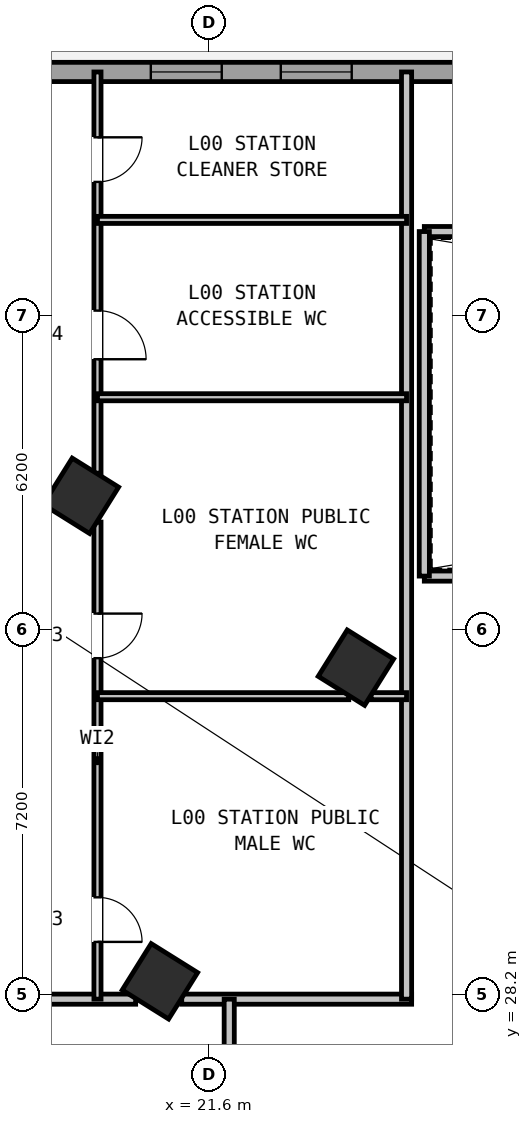
"""IFC4 building model, lengths in metres.
Left out: names, types, materials, properties, quantities, classifications, styles, units other than length and angle.
Written with IfcOpenShell. Run it as: python <this file> out.ifc"""

import sys

from ifc_helpers import new_model, si_unit, direction, frame, frame_2d, origin, origin_2d, place, context, subcontext, project, spatial, rectangle, hollow_rectangle, extrude, source, transform, mapped, element, fill, save


model = new_model("IFC4")
c1 = context("Model", 3, precision=1e-05, world=origin(), true_north=direction((0.0, 1.0)))
c2 = subcontext(c1, "Body", "Model", "MODEL_VIEW")
j1 = project(units=[si_unit("LENGTHUNIT", "METRE"), si_unit("PLANEANGLEUNIT", "RADIAN")], contexts=[c1])
p1 = place(None, origin())
s1 = spatial("IfcSite", under=j1, at=p1, CompositionType="ELEMENT")
p2 = place(p1, origin())
s2 = spatial("IfcBuilding", under=s1, at=p2, CompositionType="ELEMENT")
p3 = place(p2, origin())
s3 = spatial("IfcBuildingStorey", under=s2, at=p3, CompositionType="ELEMENT", Elevation=0.0)
m1 = source(origin(), c2, "Body", "SweptSolid", [
    extrude(hollow_rectangle(XDim=1.08, YDim=1.08, WallThickness=0.04, at=origin_2d()), origin(), (0.0, 0.0, 1.0), 5.4),
])
for number, where, z_axis, x_axis in (
    (1, (24.5, 34.643, 0.0), (0.0, 0.0, 1.0), (-0.848, 0.53, 0.0)),
    (2, (20.632, 28.452, 0.0), (0.0, 0.0, 1.0), (-0.848, 0.53, 0.0)),
    (3, (19.073, 38.034, 0.0), (0.0, 0.0, 1.0), (-0.848, 0.53, 0.0)),
):
    element("IfcColumn", number, at=place(p3, frame(where, z_axis=z_axis, x_axis=x_axis)), inside=s3, PredefinedType="COLUMN", context=c2, shape_type="MappedRepresentation", body=[
        mapped(m1, transform((0.0, 0.0, 0.0), scale=1.0)),
    ])
p4 = place(p3, frame((4.883, 46.4, 0.0), z_axis=(0.0, 0.0, 1.0), x_axis=(1.0, 0.0, 0.0)))
e4 = element("IfcWall", 4, at=p4, inside=s3, PredefinedType="STANDARD", context=c2, shape_type="SweptSolid", body=[
    extrude(rectangle(XDim=62.234, YDim=0.38, at=frame_2d((31.117, 0.0))), origin(), (0.0, 0.0, 1.0), 5.05),
])
p5 = place(p4, frame((1.542, 0.0, 0.85)))
e5 = element("IfcOpeningElement", 5, at=p5, cuts=e4, PredefinedType="OPENING", context=c2, shape_type="SweptSolid", body=[
    extrude(rectangle(XDim=2.2, YDim=1.75, at=frame_2d((1.1, 0.875))), frame((0.0, 0.2, 0.0), z_axis=(0.0, -1.0, 0.0), x_axis=(1.0, 0.0, 0.0)), (0.0, 0.0, 1.0), 0.4),
])
p6 = place(p4, frame((5.525, 0.0, 0.85)))
e6 = element("IfcOpeningElement", 6, at=p6, cuts=e4, PredefinedType="OPENING", context=c2, shape_type="SweptSolid", body=[
    extrude(rectangle(XDim=2.2, YDim=1.75, at=frame_2d((1.1, 0.875))), frame((0.0, 0.2, 0.0), z_axis=(0.0, -1.0, 0.0), x_axis=(1.0, 0.0, 0.0)), (0.0, 0.0, 1.0), 0.4),
])
p7 = place(p4, frame((10.175, 0.0, 1.0)))
e7 = element("IfcOpeningElement", 7, at=p7, cuts=e4, PredefinedType="OPENING", context=c2, shape_type="SweptSolid", body=[
    extrude(rectangle(XDim=1.1, YDim=1.35, at=frame_2d((0.55, 0.675))), frame((0.0, 0.2, 0.0), z_axis=(0.0, -1.0, 0.0), x_axis=(1.0, 0.0, 0.0)), (0.0, 0.0, 1.0), 0.4),
])
p8 = place(p4, frame((12.39, 0.0, 1.0)))
e8 = element("IfcOpeningElement", 8, at=p8, cuts=e4, PredefinedType="OPENING", context=c2, shape_type="SweptSolid", body=[
    extrude(rectangle(XDim=1.1, YDim=1.35, at=frame_2d((0.55, 0.675))), frame((0.0, 0.2, 0.0), z_axis=(0.0, -1.0, 0.0), x_axis=(1.0, 0.0, 0.0)), (0.0, 0.0, 1.0), 0.4),
])
p9 = place(p4, frame((15.57, 0.0, 0.95)))
e9 = element("IfcOpeningElement", 9, at=p9, cuts=e4, PredefinedType="OPENING", context=c2, shape_type="SweptSolid", body=[
    extrude(rectangle(XDim=1.4, YDim=1.5, at=frame_2d((0.7, 0.75))), frame((0.0, 0.2, 0.0), z_axis=(0.0, -1.0, 0.0), x_axis=(1.0, 0.0, 0.0)), (0.0, 0.0, 1.0), 0.4),
])
p10 = place(p4, frame((18.135, 0.0, 0.95)))
e10 = element("IfcOpeningElement", 10, at=p10, cuts=e4, PredefinedType="OPENING", context=c2, shape_type="SweptSolid", body=[
    extrude(rectangle(XDim=1.4, YDim=1.5, at=frame_2d((0.7, 0.75))), frame((0.0, 0.2, 0.0), z_axis=(0.0, -1.0, 0.0), x_axis=(1.0, 0.0, 0.0)), (0.0, 0.0, 1.0), 0.4),
])
p11 = place(p4, frame((21.857, 0.0, 0.85)))
e11 = element("IfcOpeningElement", 11, at=p11, cuts=e4, PredefinedType="OPENING", context=c2, shape_type="SweptSolid", body=[
    extrude(rectangle(XDim=2.2, YDim=1.75, at=frame_2d((1.1, 0.875))), frame((0.0, 0.2, 0.0), z_axis=(0.0, -1.0, 0.0), x_axis=(1.0, 0.0, 0.0)), (0.0, 0.0, 1.0), 0.4),
])
p12 = place(p4, frame((25.535, 0.0, 0.85)))
e12 = element("IfcOpeningElement", 12, at=p12, cuts=e4, PredefinedType="OPENING", context=c2, shape_type="SweptSolid", body=[
    extrude(rectangle(XDim=2.2, YDim=1.75, at=frame_2d((1.1, 0.875))), frame((0.0, 0.2, 0.0), z_axis=(0.0, -1.0, 0.0), x_axis=(1.0, 0.0, 0.0)), (0.0, 0.0, 1.0), 0.4),
])
p13 = place(p4, frame((29.214, 0.0, 0.85)))
e13 = element("IfcOpeningElement", 13, at=p13, cuts=e4, PredefinedType="OPENING", context=c2, shape_type="SweptSolid", body=[
    extrude(rectangle(XDim=2.2, YDim=1.75, at=frame_2d((1.1, 0.875))), frame((0.0, 0.2, 0.0), z_axis=(0.0, -1.0, 0.0), x_axis=(1.0, 0.0, 0.0)), (0.0, 0.0, 1.0), 0.4),
])
p14 = place(p4, frame((32.893, 0.0, 0.85)))
e14 = element("IfcOpeningElement", 14, at=p14, cuts=e4, PredefinedType="OPENING", context=c2, shape_type="SweptSolid", body=[
    extrude(rectangle(XDim=2.2, YDim=1.75, at=frame_2d((1.1, 0.875))), frame((0.0, 0.2, 0.0), z_axis=(0.0, -1.0, 0.0), x_axis=(1.0, 0.0, 0.0)), (0.0, 0.0, 1.0), 0.4),
])
p15 = place(p4, frame((36.572, 0.0, 0.85)))
e15 = element("IfcOpeningElement", 15, at=p15, cuts=e4, PredefinedType="OPENING", context=c2, shape_type="SweptSolid", body=[
    extrude(rectangle(XDim=2.2, YDim=1.75, at=frame_2d((1.1, 0.875))), frame((0.0, 0.2, 0.0), z_axis=(0.0, -1.0, 0.0), x_axis=(1.0, 0.0, 0.0)), (0.0, 0.0, 1.0), 0.4),
])
p16 = place(p4, frame((40.251, 0.0, 0.85)))
e16 = element("IfcOpeningElement", 16, at=p16, cuts=e4, PredefinedType="OPENING", context=c2, shape_type="SweptSolid", body=[
    extrude(rectangle(XDim=2.2, YDim=1.75, at=frame_2d((1.1, 0.875))), frame((0.0, 0.2, 0.0), z_axis=(0.0, -1.0, 0.0), x_axis=(1.0, 0.0, 0.0)), (0.0, 0.0, 1.0), 0.4),
])
p17 = place(p4, frame((43.93, 0.0, 0.85)))
e17 = element("IfcOpeningElement", 17, at=p17, cuts=e4, PredefinedType="OPENING", context=c2, shape_type="SweptSolid", body=[
    extrude(rectangle(XDim=2.2, YDim=1.75, at=frame_2d((1.1, 0.875))), frame((0.0, 0.2, 0.0), z_axis=(0.0, -1.0, 0.0), x_axis=(1.0, 0.0, 0.0)), (0.0, 0.0, 1.0), 0.4),
])
p18 = place(p4, frame((47.608, 0.0, 0.85)))
e18 = element("IfcOpeningElement", 18, at=p18, cuts=e4, PredefinedType="OPENING", context=c2, shape_type="SweptSolid", body=[
    extrude(rectangle(XDim=2.2, YDim=1.75, at=frame_2d((1.1, 0.875))), frame((0.0, 0.2, 0.0), z_axis=(0.0, -1.0, 0.0), x_axis=(1.0, 0.0, 0.0)), (0.0, 0.0, 1.0), 0.4),
])
p19 = place(p4, frame((51.287, 0.0, 0.85)))
e19 = element("IfcOpeningElement", 19, at=p19, cuts=e4, PredefinedType="OPENING", context=c2, shape_type="SweptSolid", body=[
    extrude(rectangle(XDim=2.2, YDim=1.75, at=frame_2d((1.1, 0.875))), frame((0.0, 0.2, 0.0), z_axis=(0.0, -1.0, 0.0), x_axis=(1.0, 0.0, 0.0)), (0.0, 0.0, 1.0), 0.4),
])
p20 = place(p4, frame((54.966, 0.0, 0.85)))
e20 = element("IfcOpeningElement", 20, at=p20, cuts=e4, PredefinedType="OPENING", context=c2, shape_type="SweptSolid", body=[
    extrude(rectangle(XDim=2.2, YDim=1.75, at=frame_2d((1.1, 0.875))), frame((0.0, 0.2, 0.0), z_axis=(0.0, -1.0, 0.0), x_axis=(1.0, 0.0, 0.0)), (0.0, 0.0, 1.0), 0.4),
])
p21 = place(p4, frame((58.645, 0.0, 0.85)))
e21 = element("IfcOpeningElement", 21, at=p21, cuts=e4, PredefinedType="OPENING", context=c2, shape_type="SweptSolid", body=[
    extrude(rectangle(XDim=2.2, YDim=1.75, at=frame_2d((1.1, 0.875))), frame((0.0, 0.2, 0.0), z_axis=(0.0, -1.0, 0.0), x_axis=(1.0, 0.0, 0.0)), (0.0, 0.0, 1.0), 0.4),
])
p22 = place(p3, frame((1.6, 28.1, 0.0), z_axis=(0.0, 0.0, 1.0), x_axis=(1.0, 0.0, 0.0)))
e22 = element("IfcWall", 22, at=p22, inside=s3, PredefinedType="STANDARD", context=c2, shape_type="SweptSolid", body=[
    extrude(rectangle(XDim=18.554, YDim=0.2, at=frame_2d((9.277, 0.0))), origin(), (0.0, 0.0, 1.0), 5.04),
])
p23 = place(p22, frame((5.2, 0.0, 0.0)))
e23 = element("IfcOpeningElement", 23, at=p23, cuts=e22, PredefinedType="OPENING", context=c2, shape_type="SweptSolid", body=[
    extrude(rectangle(XDim=1.7, YDim=2.2, at=frame_2d((0.85, 1.1))), frame((0.0, 0.11, 0.0), z_axis=(0.0, -1.0, 0.0), x_axis=(1.0, 0.0, 0.0)), (0.0, 0.0, 1.0), 0.22),
])
p24 = place(p22, frame((13.0, 0.0, 0.0)))
e24 = element("IfcOpeningElement", 24, at=p24, cuts=e22, PredefinedType="OPENING", context=c2, shape_type="SweptSolid", body=[
    extrude(rectangle(XDim=1.0, YDim=2.1, at=frame_2d((0.5, 1.05))), frame((0.0, 0.11, 0.0), z_axis=(0.0, -1.0, 0.0), x_axis=(1.0, 0.0, 0.0)), (0.0, 0.0, 1.0), 0.22),
])
p25 = place(p3, frame((21.063, 28.1, 0.0), z_axis=(0.0, 0.0, 1.0), x_axis=(1.0, 0.0, 0.0)))
e25 = element("IfcWall", 25, at=p25, inside=s3, PredefinedType="STANDARD", context=c2, shape_type="SweptSolid", body=[
    extrude(rectangle(XDim=4.537, YDim=0.2, at=frame_2d((2.269, 0.0))), origin(), (0.0, 0.0, 1.0), 5.04),
])
p26 = place(p3, frame((22.0, 19.53, 0.0), z_axis=(0.0, 0.0, 1.0), x_axis=(0.0, 1.0, 0.0)))
e26 = element("IfcWall", 26, at=p26, inside=s3, PredefinedType="STANDARD", context=c2, shape_type="SweptSolid", body=[
    extrude(rectangle(XDim=8.57, YDim=0.2, at=frame_2d((4.285, 0.0))), origin(), (0.0, 0.0, 1.0), 5.04),
])
p27 = place(p3, frame((25.5, 28.1, 0.0), z_axis=(0.0, 0.0, 1.0), x_axis=(0.0, 1.0, 0.0)))
e27 = element("IfcWall", 27, at=p27, inside=s3, PredefinedType="STANDARD", context=c2, shape_type="SweptSolid", body=[
    extrude(rectangle(XDim=18.3, YDim=0.2, at=frame_2d((9.15, 0.0))), origin(), (0.0, 0.0, 1.0), 5.04),
])
p28 = place(p3, frame((19.4, 28.1, 0.0), z_axis=(0.0, 0.0, 1.0), x_axis=(0.0, 1.0, 0.0)))
e28 = element("IfcWall", 28, at=p28, inside=s3, PredefinedType="PLUMBINGWALL", context=c2, shape_type="SweptSolid", body=[
    extrude(rectangle(XDim=9.416, YDim=0.14, at=frame_2d((4.708, 0.0))), origin(), (0.0, 0.0, 1.0), 5.04),
])
p29 = place(p28, frame((1.13, 0.0, 0.0)))
e29 = element("IfcOpeningElement", 29, at=p29, cuts=e28, PredefinedType="OPENING", context=c2, shape_type="SweptSolid", body=[
    extrude(rectangle(XDim=0.88, YDim=2.08, at=frame_2d((0.44, 1.04))), frame((0.0, 0.08, 0.0), z_axis=(0.0, -1.0, 0.0), x_axis=(1.0, 0.0, 0.0)), (0.0, 0.0, 1.0), 0.16),
])
p30 = place(p28, frame((6.73, 0.0, 0.0)))
e30 = element("IfcOpeningElement", 30, at=p30, cuts=e28, PredefinedType="OPENING", context=c2, shape_type="SweptSolid", body=[
    extrude(rectangle(XDim=0.88, YDim=2.08, at=frame_2d((0.44, 1.04))), frame((0.0, 0.08, 0.0), z_axis=(0.0, -1.0, 0.0), x_axis=(1.0, 0.0, 0.0)), (0.0, 0.0, 1.0), 0.16),
])
p31 = place(p3, frame((19.4, 38.481, 0.0), z_axis=(0.0, 0.0, 1.0), x_axis=(0.0, 1.0, 0.0)))
e31 = element("IfcWall", 31, at=p31, inside=s3, PredefinedType="PLUMBINGWALL", context=c2, shape_type="SweptSolid", body=[
    extrude(rectangle(XDim=7.919, YDim=0.14, at=frame_2d((3.959, 0.0))), origin(), (0.0, 0.0, 1.0), 5.04),
])
p32 = place(p31, frame((2.249, 0.0, 0.0)))
e32 = element("IfcOpeningElement", 32, at=p32, cuts=e31, PredefinedType="OPENING", context=c2, shape_type="SweptSolid", body=[
    extrude(rectangle(XDim=0.96, YDim=2.08, at=frame_2d((0.48, 1.04))), frame((0.0, 0.08, 0.0), z_axis=(0.0, -1.0, 0.0), x_axis=(1.0, 0.0, 0.0)), (0.0, 0.0, 1.0), 0.16),
])
p33 = place(p31, frame((5.749, 0.0, 0.0)))
e33 = element("IfcOpeningElement", 33, at=p33, cuts=e31, PredefinedType="OPENING", context=c2, shape_type="SweptSolid", body=[
    extrude(rectangle(XDim=0.88, YDim=2.08, at=frame_2d((0.44, 1.04))), frame((0.0, 0.08, 0.0), z_axis=(0.0, -1.0, 0.0), x_axis=(1.0, 0.0, 0.0)), (0.0, 0.0, 1.0), 0.16),
])
p34 = place(p3, frame((19.4, 34.08, 0.0), z_axis=(0.0, 0.0, 1.0), x_axis=(1.0, 0.0, 0.0)))
e34 = element("IfcWall", 34, at=p34, inside=s3, PredefinedType="PLUMBINGWALL", context=c2, shape_type="SweptSolid", body=[
    extrude(rectangle(XDim=4.96, YDim=0.14, at=frame_2d((2.48, 0.0))), origin(), (0.0, 0.0, 1.0), 5.04),
])
p35 = place(p3, frame((24.8, 34.08, 0.0), z_axis=(0.0, 0.0, 1.0), x_axis=(1.0, 0.0, 0.0)))
e35 = element("IfcWall", 35, at=p35, inside=s3, PredefinedType="PLUMBINGWALL", context=c2, shape_type="SweptSolid", body=[
    extrude(rectangle(XDim=0.7, YDim=0.14, at=frame_2d((0.35, 0.0))), origin(), (0.0, 0.0, 1.0), 5.04),
])
for number, where, z_axis, x_axis in (
    (36, (19.4, 39.98, 0.0), (0.0, 0.0, 1.0), (1.0, 0.0, 0.0)),
    (37, (19.4, 43.48, 0.0), (0.0, 0.0, 1.0), (1.0, 0.0, 0.0)),
):
    element("IfcWall", number, at=place(p3, frame(where, z_axis=z_axis, x_axis=x_axis)), inside=s3, PredefinedType="PLUMBINGWALL", context=c2, shape_type="SweptSolid", body=[
        extrude(rectangle(XDim=6.1, YDim=0.14, at=frame_2d((3.05, 0.0))), origin(), (0.0, 0.0, 1.0), 5.04),
    ])
p36 = place(p3, frame((25.85, 36.45, 0.0), z_axis=(0.0, 0.0, 1.0), x_axis=(1.0, 0.0, 0.0)))
e38 = element("IfcWall", 38, at=p36, inside=s3, PredefinedType="STANDARD", context=c2, shape_type="SweptSolid", body=[
    extrude(rectangle(XDim=44.55, YDim=0.2, at=frame_2d((22.275, 0.0))), origin(), (0.0, 0.0, 1.0), 5.04),
])
p37 = place(p3, frame((25.85, 43.25, 0.0), z_axis=(0.0, 0.0, 1.0), x_axis=(1.0, 0.0, 0.0)))
e39 = element("IfcWall", 39, at=p37, inside=s3, PredefinedType="STANDARD", context=c2, shape_type="SweptSolid", body=[
    extrude(rectangle(XDim=3.398, YDim=0.2, at=frame_2d((1.699, 0.0))), origin(), (0.0, 0.0, 1.0), 5.04),
])
p38 = place(p3, frame((25.85, 36.45, 0.0), z_axis=(0.0, 0.0, 1.0), x_axis=(0.0, 1.0, 0.0)))
e40 = element("IfcWall", 40, at=p38, inside=s3, PredefinedType="STANDARD", context=c2, shape_type="SweptSolid", body=[
    extrude(rectangle(XDim=6.8, YDim=0.2, at=frame_2d((3.4, 0.0))), origin(), (0.0, 0.0, 1.0), 5.04),
])
m2 = source(origin(), c2, "Body", "SweptSolid", [
    extrude(rectangle(XDim=1.4, YDim=1.5, at=frame_2d((0.7, 0.75))), frame((0.0, 0.03, 0.0), z_axis=(0.0, -1.0, 0.0), x_axis=(1.0, 0.0, 0.0)), (0.0, 0.0, 1.0), 0.06),
])
p39 = place(p9, origin())
e41 = element("IfcWindow", 41, at=p39, inside=s3, PartitioningType="SINGLE_PANEL", PredefinedType="WINDOW", context=c2, shape_type="MappedRepresentation", body=[
    mapped(m2, transform((0.0, 0.0, 0.0), scale=1.0)),
])
fill(e9, e41)
p40 = place(p10, origin())
e42 = element("IfcWindow", 42, at=p40, inside=s3, PartitioningType="SINGLE_PANEL", PredefinedType="WINDOW", context=c2, shape_type="MappedRepresentation", body=[
    mapped(m2, transform((0.0, 0.0, 0.0), scale=1.0)),
])
fill(e10, e42)
m3 = source(origin(), c2, "Body", "SweptSolid", [
    extrude(rectangle(XDim=0.88, YDim=2.08, at=frame_2d((0.44, 1.04))), frame((0.0, 0.025, 0.0), z_axis=(0.0, -1.0, 0.0), x_axis=(1.0, 0.0, 0.0)), (0.0, 0.0, 1.0), 0.05),
])
p41 = place(p29, frame((0.88, 0.0, 0.0), z_axis=(0.0, 0.0, 1.0), x_axis=(-1.0, 0.0, 0.0)))
e43 = element("IfcDoor", 43, at=p41, inside=s3, OperationType="SINGLE_SWING_RIGHT", PredefinedType="DOOR", context=c2, shape_type="MappedRepresentation", body=[
    mapped(m3, transform((0.0, 0.0, 0.0), scale=1.0)),
])
fill(e29, e43)
p42 = place(p30, frame((0.88, 0.0, 0.0), z_axis=(0.0, 0.0, 1.0), x_axis=(-1.0, 0.0, 0.0)))
e44 = element("IfcDoor", 44, at=p42, inside=s3, OperationType="SINGLE_SWING_LEFT", PredefinedType="DOOR", context=c2, shape_type="MappedRepresentation", body=[
    mapped(m3, transform((0.0, 0.0, 0.0), scale=1.0)),
])
fill(e30, e44)
m4 = source(origin(), c2, "Body", "SweptSolid", [
    extrude(rectangle(XDim=0.96, YDim=2.08, at=frame_2d((0.48, 1.04))), frame((0.0, 0.025, 0.0), z_axis=(0.0, -1.0, 0.0), x_axis=(1.0, 0.0, 0.0)), (0.0, 0.0, 1.0), 0.05),
])
p43 = place(p32, frame((0.96, 0.0, 0.0), z_axis=(0.0, 0.0, 1.0), x_axis=(-1.0, 0.0, 0.0)))
e45 = element("IfcDoor", 45, at=p43, inside=s3, OperationType="SINGLE_SWING_RIGHT", PredefinedType="DOOR", context=c2, shape_type="MappedRepresentation", body=[
    mapped(m4, transform((0.0, 0.0, 0.0), scale=1.0)),
])
fill(e32, e45)
p44 = place(p33, frame((0.88, 0.0, 0.0), z_axis=(0.0, 0.0, 1.0), x_axis=(-1.0, 0.0, 0.0)))
e46 = element("IfcDoor", 46, at=p44, inside=s3, OperationType="SINGLE_SWING_LEFT", PredefinedType="DOOR", context=c2, shape_type="MappedRepresentation", body=[
    mapped(m3, transform((0.0, 0.0, 0.0), scale=1.0)),
])
fill(e33, e46)
save(model, sys.argv[1])
